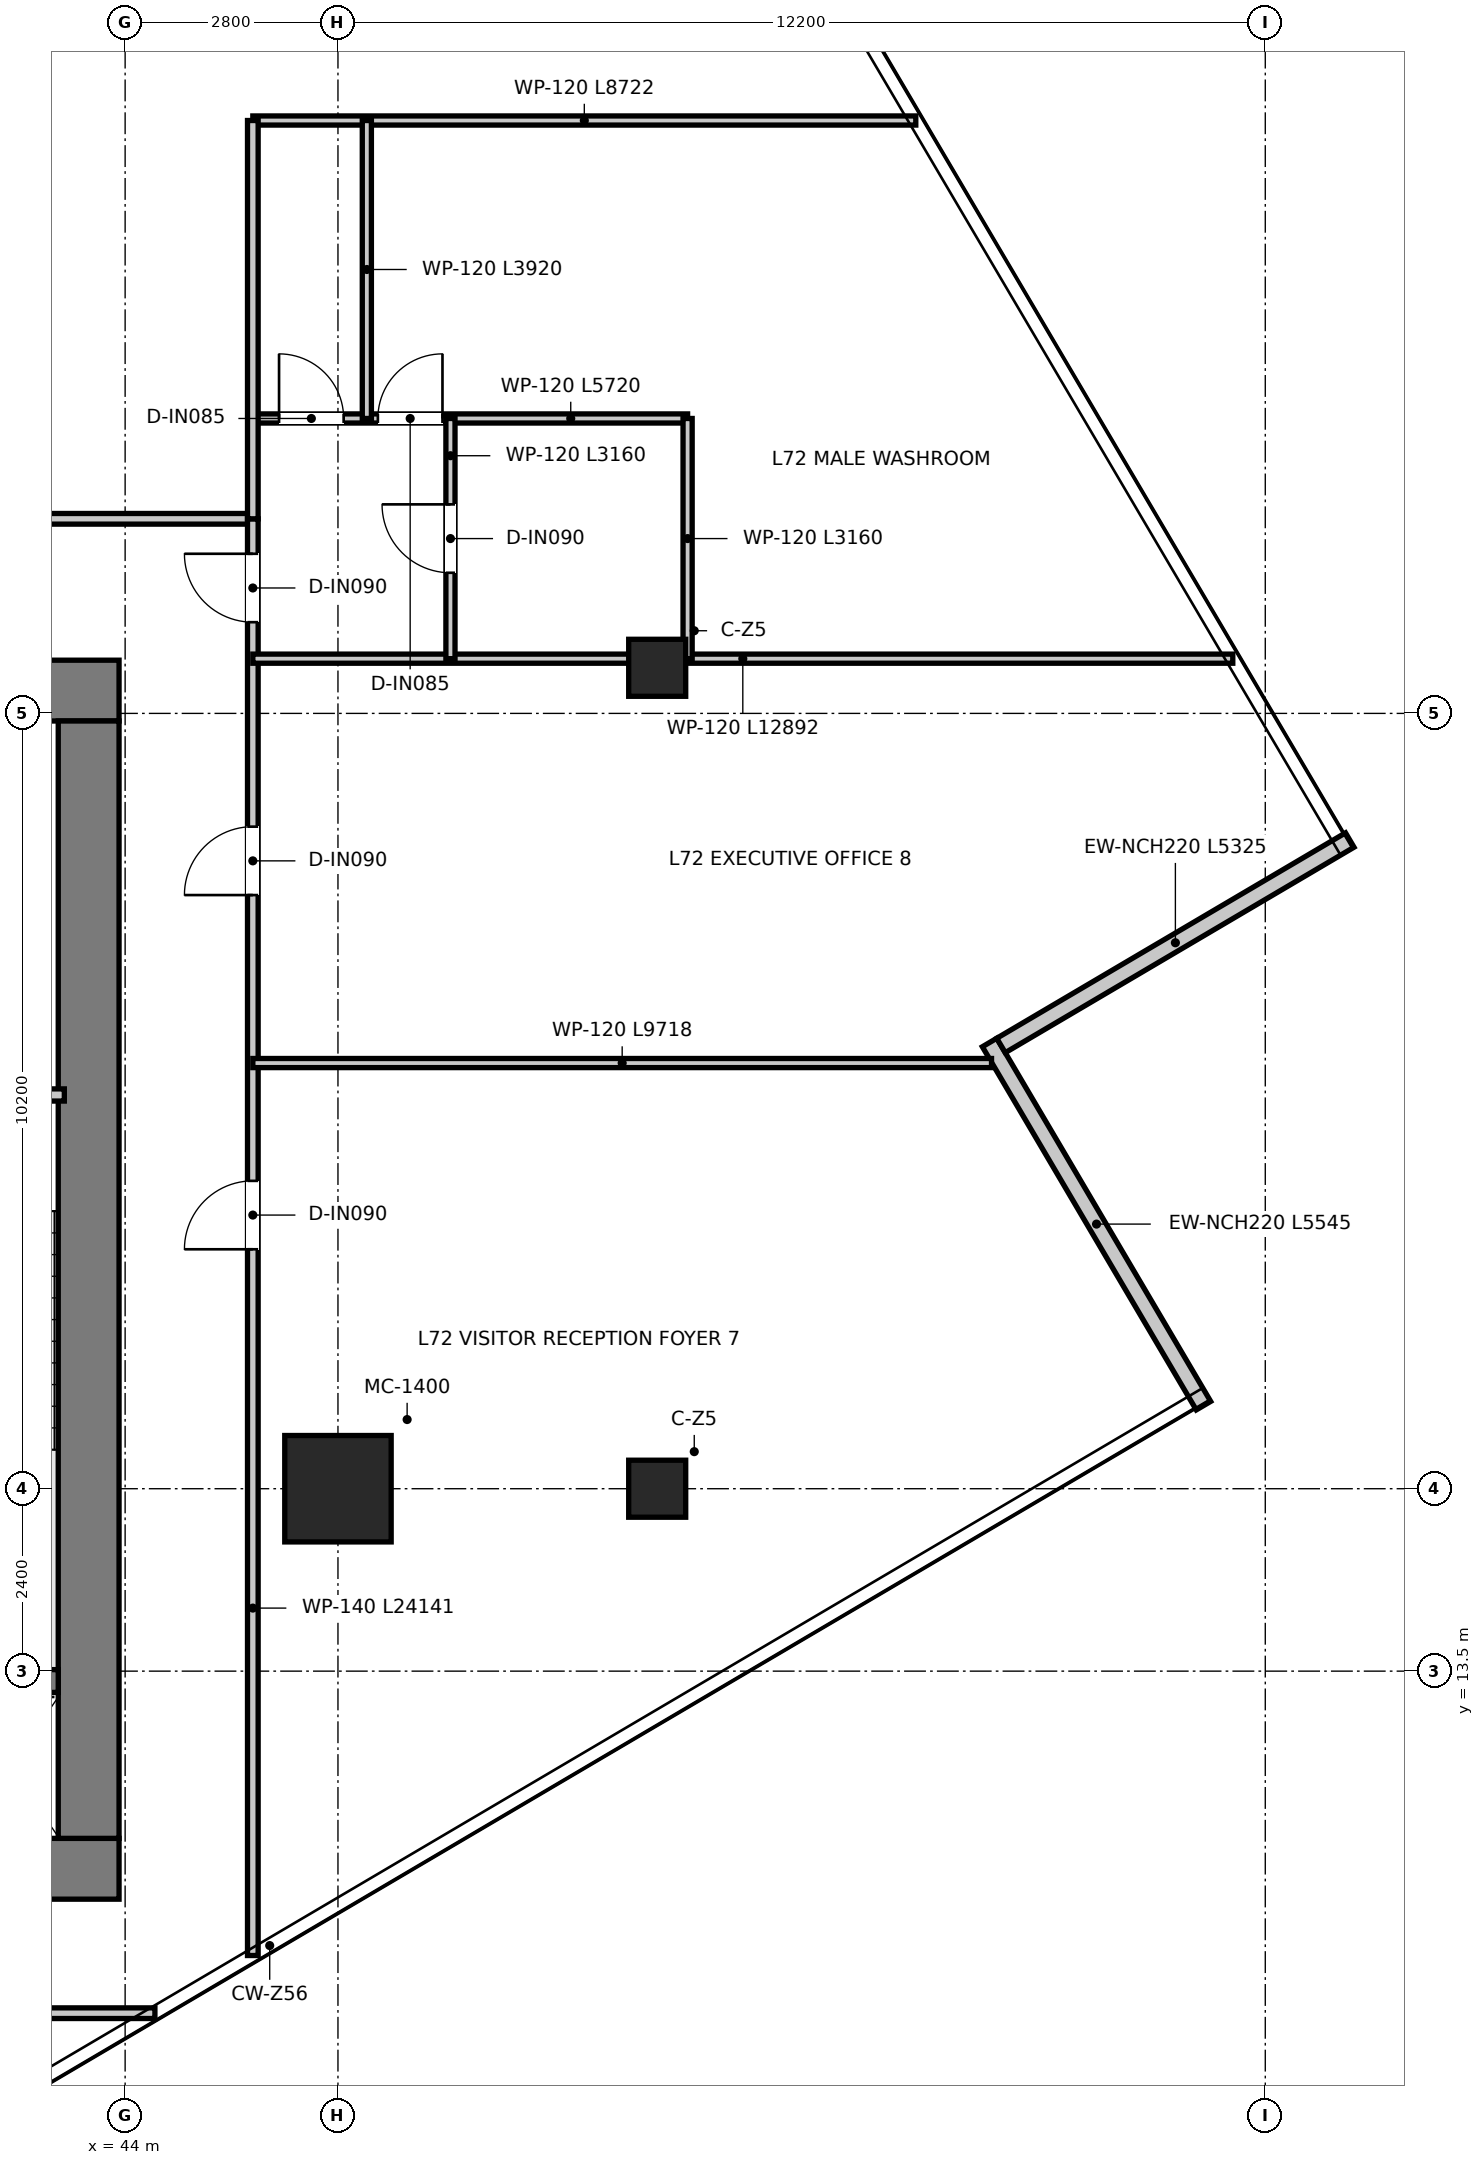
"""IFC4 building model, lengths in metres.
Left out: names, types, materials, properties, quantities, classifications, styles, units other than length and angle.
Written with IfcOpenShell. Run it as: python <this file> out.ifc"""

import sys

from ifc_helpers import new_model, si_unit, direction, frame, frame_2d, origin, origin_2d, place, context, subcontext, project, spatial, rectangle, extrude, source, transform, mapped, element, fill, save


model = new_model("IFC4")
c1 = context("Model", 3, precision=1e-05, world=origin(), true_north=direction((0.0, 1.0)))
c2 = subcontext(c1, "Body", "Model", "MODEL_VIEW")
j1 = project(units=[si_unit("LENGTHUNIT", "METRE"), si_unit("PLANEANGLEUNIT", "RADIAN")], contexts=[c1])
p1 = place(None, origin())
s1 = spatial("IfcSite", under=j1, at=p1, CompositionType="ELEMENT")
p2 = place(p1, origin())
s2 = spatial("IfcBuilding", under=s1, at=p2, CompositionType="ELEMENT")
p3 = place(p2, frame((0.0, 0.0, 295.05)))
s3 = spatial("IfcBuildingStorey", under=s2, at=p3, CompositionType="ELEMENT", Elevation=295.05)
p4 = place(p3, frame((28.08, 10.9, 0.0), z_axis=(0.0, 0.0, 1.0), x_axis=(1.0, 0.0, 0.0)))
e1 = element("IfcWall", 1, at=p4, inside=s3, PredefinedType="SHEAR", context=c2, shape_type="SweptSolid", body=[
    extrude(rectangle(XDim=15.84, YDim=0.8, at=frame_2d((7.92, 0.0))), origin(), (0.0, 0.0, 1.0), 3.95),
])
p5 = place(p3, frame((28.08, 26.4, 0.0), z_axis=(0.0, 0.0, 1.0), x_axis=(1.0, 0.0, 0.0)))
e2 = element("IfcWall", 2, at=p5, inside=s3, PredefinedType="SHEAR", context=c2, shape_type="SweptSolid", body=[
    extrude(rectangle(XDim=15.84, YDim=0.8, at=frame_2d((7.92, 0.0))), origin(), (0.0, 0.0, 1.0), 3.95),
])
p6 = place(p5, frame((7.22, 0.0, 0.0)))
e3 = element("IfcOpeningElement", 3, at=p6, cuts=e2, PredefinedType="OPENING", context=c2, shape_type="SweptSolid", body=[
    extrude(rectangle(XDim=1.4, YDim=2.2, at=frame_2d((0.7, 1.1))), frame((0.0, 0.41, 0.0), z_axis=(0.0, -1.0, 0.0), x_axis=(1.0, 0.0, 0.0)), (0.0, 0.0, 1.0), 0.82),
])
p7 = place(p5, frame((1.775, 0.0, 0.0)))
e4 = element("IfcOpeningElement", 4, at=p7, cuts=e2, PredefinedType="OPENING", context=c2, shape_type="SweptSolid", body=[
    extrude(rectangle(XDim=1.05, YDim=2.1, at=frame_2d((0.525, 1.05))), frame((0.0, 0.41, 0.0), z_axis=(0.0, -1.0, 0.0), x_axis=(1.0, 0.0, 0.0)), (0.0, 0.0, 1.0), 0.82),
])
p8 = place(p5, frame((13.015, 0.0, 0.0)))
e5 = element("IfcOpeningElement", 5, at=p8, cuts=e2, PredefinedType="OPENING", context=c2, shape_type="SweptSolid", body=[
    extrude(rectangle(XDim=1.05, YDim=2.1, at=frame_2d((0.525, 1.05))), frame((0.0, 0.41, 0.0), z_axis=(0.0, -1.0, 0.0), x_axis=(1.0, 0.0, 0.0)), (0.0, 0.0, 1.0), 0.82),
])
p9 = place(p3, frame((43.52, 11.3, 0.0), z_axis=(0.0, 0.0, 1.0), x_axis=(0.0, 1.0, 0.0)))
e6 = element("IfcWall", 6, at=p9, inside=s3, PredefinedType="SHEAR", context=c2, shape_type="SweptSolid", body=[
    extrude(rectangle(XDim=14.7, YDim=0.8, at=frame_2d((7.35, 0.0))), origin(), (0.0, 0.0, 1.0), 3.95),
])
p10 = place(p3, frame((40.02, 13.37, 0.0), z_axis=(0.0, 0.0, 1.0), x_axis=(1.0, 0.0, 0.0)))
e7 = element("IfcWall", 7, at=p10, inside=s3, PredefinedType="SHEAR", context=c2, shape_type="SweptSolid", body=[
    extrude(rectangle(XDim=3.1, YDim=0.3, at=frame_2d((1.55, 0.0))), origin(), (0.0, 0.0, 1.0), 3.95),
])
m1 = source(origin(), c2, "Body", "SweptSolid", [
    extrude(rectangle(XDim=1.4, YDim=1.4, at=origin_2d()), origin(), (0.0, 0.0, 1.0), 3.95),
])
p11 = place(p3, frame((46.8, 15.9, 0.0), z_axis=(0.0, 0.0, 1.0), x_axis=(1.0, 0.0, 0.0)))
e8 = element("IfcColumn", 8, at=p11, inside=s3, PredefinedType="USERDEFINED", context=c2, shape_type="MappedRepresentation", body=[
    mapped(m1, transform((0.0, 0.0, 0.0), x_axis=(1.0, 0.0, 0.0), y_axis=(0.0, 1.0, 0.0), z_axis=(0.0, 0.0, 1.0), scale=1.0)),
])
m2 = source(origin(), c2, "Body", "SweptSolid", [
    extrude(rectangle(XDim=0.75, YDim=0.75, at=origin_2d()), origin(), (0.0, 0.0, 1.0), 3.95),
])
for number, where, z_axis, x_axis in (
    (9, (51.0, 26.7, 0.0), (0.0, 0.0, 1.0), (1.0, 0.0, 0.0)),
    (10, (51.0, 15.9, 0.0), (0.0, 0.0, 1.0), (1.0, 0.0, 0.0)),
):
    element("IfcColumn", number, at=place(p3, frame(where, z_axis=z_axis, x_axis=x_axis)), inside=s3, PredefinedType="COLUMN", context=c2, shape_type="MappedRepresentation", body=[
        mapped(m2, transform((0.0, 0.0, 0.0), x_axis=(1.0, 0.0, 0.0), y_axis=(0.0, 1.0, 0.0), z_axis=(0.0, 0.0, 1.0), scale=1.0)),
    ])
p12 = place(p3, frame((58.187, 16.992, 0.0), z_axis=(0.0, 0.0, 1.0), x_axis=(-0.507551078836, 0.861621670092, 0.0)))
e11 = element("IfcWall", 11, at=p12, inside=s3, PredefinedType="ELEMENTEDWALL", context=c2, shape_type="SweptSolid", body=[
    extrude(rectangle(XDim=5.545, YDim=0.22, at=frame_2d((2.772, 0.0))), origin(), (0.0, 0.0, 1.0), 3.67),
])
p13 = place(p3, frame((55.523, 21.731, 0.0), z_axis=(0.0, 0.0, 1.0), x_axis=(0.861627616465, 0.507540984104, 0.0)))
e12 = element("IfcWall", 12, at=p13, inside=s3, PredefinedType="ELEMENTEDWALL", context=c2, shape_type="SweptSolid", body=[
    extrude(rectangle(XDim=5.325, YDim=0.22, at=frame_2d((2.663, 0.0))), origin(), (0.0, 0.0, 1.0), 3.67),
])
p14 = place(p3, frame((40.04, 21.08, 0.0), z_axis=(0.0, 0.0, 1.0), x_axis=(1.0, 0.0, 0.0)))
e13 = element("IfcWall", 13, at=p14, inside=s3, PredefinedType="PARTITIONING", context=c2, shape_type="SweptSolid", body=[
    extrude(rectangle(XDim=3.16, YDim=0.16, at=frame_2d((1.58, 0.0))), origin(), (0.0, 0.0, 1.0), 3.67),
])
p15 = place(p14, frame((1.055, 0.0, 0.0)))
e14 = element("IfcOpeningElement", 14, at=p15, cuts=e13, PredefinedType="OPENING", context=c2, shape_type="SweptSolid", body=[
    extrude(rectangle(XDim=1.05, YDim=2.1, at=frame_2d((0.525, 1.05))), frame((0.0, 0.09, 0.0), z_axis=(0.0, -1.0, 0.0), x_axis=(1.0, 0.0, 0.0)), (0.0, 0.0, 1.0), 0.18),
])
p16 = place(p3, frame((26.32, 28.66, 0.0), z_axis=(0.0, 0.0, 1.0), x_axis=(1.0, 0.0, 0.0)))
e15 = element("IfcWall", 15, at=p16, inside=s3, PredefinedType="PARTITIONING", context=c2, shape_type="SweptSolid", body=[
    extrude(rectangle(XDim=19.36, YDim=0.14, at=frame_2d((9.68, 0.0))), origin(), (0.0, 0.0, 1.0), 3.18),
])
p17 = place(p16, frame((4.265, 0.0, 0.0)))
e16 = element("IfcOpeningElement", 16, at=p17, cuts=e15, PredefinedType="OPENING", context=c2, shape_type="SweptSolid", body=[
    extrude(rectangle(XDim=0.95, YDim=2.1, at=frame_2d((0.475, 1.05))), frame((0.0, 0.08, 0.0), z_axis=(0.0, -1.0, 0.0), x_axis=(1.0, 0.0, 0.0)), (0.0, 0.0, 1.0), 0.16),
])
p18 = place(p16, frame((13.945, 0.0, 0.0)))
e17 = element("IfcOpeningElement", 17, at=p18, cuts=e15, PredefinedType="OPENING", context=c2, shape_type="SweptSolid", body=[
    extrude(rectangle(XDim=0.95, YDim=2.1, at=frame_2d((0.475, 1.05))), frame((0.0, 0.08, 0.0), z_axis=(0.0, -1.0, 0.0), x_axis=(1.0, 0.0, 0.0)), (0.0, 0.0, 1.0), 0.16),
])
p19 = place(p3, frame((45.68, 9.759, 0.0), z_axis=(0.0, 0.0, 1.0), x_axis=(0.0, 1.0, 0.0)))
e18 = element("IfcWall", 18, at=p19, inside=s3, PredefinedType="PARTITIONING", context=c2, shape_type="SweptSolid", body=[
    extrude(rectangle(XDim=18.901, YDim=0.14, at=frame_2d((9.451, 0.0))), origin(), (0.0, 0.0, 1.0), 3.13),
])
p20 = place(p19, frame((17.541, 0.0, 0.0)))
e19 = element("IfcOpeningElement", 19, at=p20, cuts=e18, PredefinedType="OPENING", context=c2, shape_type="SweptSolid", body=[
    extrude(rectangle(XDim=0.9, YDim=2.1, at=frame_2d((0.45, 1.05))), frame((0.0, 0.08, 0.0), z_axis=(0.0, -1.0, 0.0), x_axis=(1.0, 0.0, 0.0)), (0.0, 0.0, 1.0), 0.16),
])
p21 = place(p19, frame((9.291, 0.0, 0.0)))
e20 = element("IfcOpeningElement", 20, at=p21, cuts=e18, PredefinedType="OPENING", context=c2, shape_type="SweptSolid", body=[
    extrude(rectangle(XDim=0.9, YDim=2.1, at=frame_2d((0.45, 1.05))), frame((0.0, 0.08, 0.0), z_axis=(0.0, -1.0, 0.0), x_axis=(1.0, 0.0, 0.0)), (0.0, 0.0, 1.0), 0.16),
])
p22 = place(p19, frame((13.951, 0.0, 0.0)))
e21 = element("IfcOpeningElement", 21, at=p22, cuts=e18, PredefinedType="OPENING", context=c2, shape_type="SweptSolid", body=[
    extrude(rectangle(XDim=0.9, YDim=2.1, at=frame_2d((0.45, 1.05))), frame((0.0, 0.08, 0.0), z_axis=(0.0, -1.0, 0.0), x_axis=(1.0, 0.0, 0.0)), (0.0, 0.0, 1.0), 0.16),
])
p23 = place(p3, frame((23.783, 9.0, 0.0), z_axis=(0.0, 0.0, 1.0), x_axis=(1.0, 0.0, 0.0)))
e22 = element("IfcWall", 22, at=p23, inside=s3, PredefinedType="PARTITIONING", context=c2, shape_type="SweptSolid", body=[
    extrude(rectangle(XDim=20.609, YDim=0.14, at=frame_2d((10.304, 0.0))), origin(), (0.0, 0.0, 1.0), 3.67),
])
p24 = place(p23, frame((11.767, 0.0, 0.0)))
e23 = element("IfcOpeningElement", 23, at=p24, cuts=e22, PredefinedType="OPENING", context=c2, shape_type="SweptSolid", body=[
    extrude(rectangle(XDim=0.9, YDim=2.1, at=frame_2d((0.45, 1.05))), frame((0.0, 0.08, 0.0), z_axis=(0.0, -1.0, 0.0), x_axis=(1.0, 0.0, 0.0)), (0.0, 0.0, 1.0), 0.16),
])
p25 = place(p3, frame((45.68, 26.82, 0.0), z_axis=(0.0, 0.0, 1.0), x_axis=(1.0, 0.0, 0.0)))
e24 = element("IfcWall", 24, at=p25, inside=s3, PredefinedType="PARTITIONING", context=c2, shape_type="SweptSolid", body=[
    extrude(rectangle(XDim=12.893, YDim=0.12, at=frame_2d((6.446, 0.0))), origin(), (0.0, 0.0, 1.0), 3.13),
])
p26 = place(p3, frame((45.68, 33.9, 0.0), z_axis=(0.0, 0.0, 1.0), x_axis=(1.0, 0.0, 0.0)))
e25 = element("IfcWall", 25, at=p26, inside=s3, PredefinedType="PARTITIONING", context=c2, shape_type="SweptSolid", body=[
    extrude(rectangle(XDim=8.722, YDim=0.12, at=frame_2d((4.361, 0.0))), origin(), (0.0, 0.0, 1.0), 3.13),
])
p27 = place(p3, frame((45.68, 29.98, 0.0), z_axis=(0.0, 0.0, 1.0), x_axis=(1.0, 0.0, 0.0)))
e26 = element("IfcWall", 26, at=p27, inside=s3, PredefinedType="PARTITIONING", context=c2, shape_type="SweptSolid", body=[
    extrude(rectangle(XDim=5.72, YDim=0.12, at=frame_2d((2.86, 0.0))), origin(), (0.0, 0.0, 1.0), 3.13),
])
p28 = place(p27, frame((1.645, 0.0, 0.0)))
e27 = element("IfcOpeningElement", 27, at=p28, cuts=e26, PredefinedType="OPENING", context=c2, shape_type="SweptSolid", body=[
    extrude(rectangle(XDim=0.85, YDim=2.1, at=frame_2d((0.425, 1.05))), frame((0.0, 0.07, 0.0), z_axis=(0.0, -1.0, 0.0), x_axis=(1.0, 0.0, 0.0)), (0.0, 0.0, 1.0), 0.14),
])
p29 = place(p27, frame((0.345, 0.0, 0.0)))
e28 = element("IfcOpeningElement", 28, at=p29, cuts=e26, PredefinedType="OPENING", context=c2, shape_type="SweptSolid", body=[
    extrude(rectangle(XDim=0.85, YDim=2.1, at=frame_2d((0.425, 1.05))), frame((0.0, 0.07, 0.0), z_axis=(0.0, -1.0, 0.0), x_axis=(1.0, 0.0, 0.0)), (0.0, 0.0, 1.0), 0.14),
])
p30 = place(p3, frame((51.4, 26.82, 0.0), z_axis=(0.0, 0.0, 1.0), x_axis=(0.0, 1.0, 0.0)))
e29 = element("IfcWall", 29, at=p30, inside=s3, PredefinedType="PARTITIONING", context=c2, shape_type="SweptSolid", body=[
    extrude(rectangle(XDim=3.16, YDim=0.12, at=frame_2d((1.58, 0.0))), origin(), (0.0, 0.0, 1.0), 3.67),
])
p31 = place(p3, frame((48.28, 26.82, 0.0), z_axis=(0.0, 0.0, 1.0), x_axis=(0.0, 1.0, 0.0)))
e30 = element("IfcWall", 30, at=p31, inside=s3, PredefinedType="PARTITIONING", context=c2, shape_type="SweptSolid", body=[
    extrude(rectangle(XDim=3.16, YDim=0.12, at=frame_2d((1.58, 0.0))), origin(), (0.0, 0.0, 1.0), 3.18),
])
p32 = place(p31, frame((1.13, 0.0, 0.0)))
e31 = element("IfcOpeningElement", 31, at=p32, cuts=e30, PredefinedType="OPENING", context=c2, shape_type="SweptSolid", body=[
    extrude(rectangle(XDim=0.9, YDim=2.1, at=frame_2d((0.45, 1.05))), frame((0.0, 0.07, 0.0), z_axis=(0.0, -1.0, 0.0), x_axis=(1.0, 0.0, 0.0)), (0.0, 0.0, 1.0), 0.14),
])
p33 = place(p3, frame((47.18, 29.98, 0.0), z_axis=(0.0, 0.0, 1.0), x_axis=(0.0, 1.0, 0.0)))
e32 = element("IfcWall", 32, at=p33, inside=s3, PredefinedType="PARTITIONING", context=c2, shape_type="SweptSolid", body=[
    extrude(rectangle(XDim=3.92, YDim=0.12, at=frame_2d((1.96, 0.0))), origin(), (0.0, 0.0, 1.0), 3.31),
])
p34 = place(p3, frame((45.68, 28.66, 0.0), z_axis=(0.0, 0.0, 1.0), x_axis=(0.0, 1.0, 0.0)))
e33 = element("IfcWall", 33, at=p34, inside=s3, PredefinedType="PARTITIONING", context=c2, shape_type="SweptSolid", body=[
    extrude(rectangle(XDim=5.24, YDim=0.14, at=frame_2d((2.62, 0.0))), origin(), (0.0, 0.0, 1.0), 3.43),
])
p35 = place(p3, frame((45.68, 21.5, 0.0), z_axis=(0.0, 0.0, 1.0), x_axis=(1.0, 0.0, 0.0)))
e34 = element("IfcWall", 34, at=p35, inside=s3, PredefinedType="PARTITIONING", context=c2, shape_type="SweptSolid", body=[
    extrude(rectangle(XDim=9.719, YDim=0.12, at=frame_2d((4.859, 0.0))), origin(), (0.0, 0.0, 1.0), 3.13),
])
p36 = place(p20, origin())
e35 = element("IfcDoor", 35, at=p36, inside=s3, OperationType="SINGLE_SWING_RIGHT", PredefinedType="DOOR", context=c2, shape_type="SweptSolid", body=[
    extrude(rectangle(XDim=0.9, YDim=2.1, at=frame_2d((0.45, 1.05))), frame((0.0, 0.025, 0.0), z_axis=(0.0, -1.0, 0.0), x_axis=(1.0, 0.0, 0.0)), (0.0, 0.0, 1.0), 0.05),
])
fill(e19, e35)
p37 = place(p28, origin())
e36 = element("IfcDoor", 36, at=p37, inside=s3, OperationType="SINGLE_SWING_RIGHT", PredefinedType="DOOR", context=c2, shape_type="SweptSolid", body=[
    extrude(rectangle(XDim=0.85, YDim=2.1, at=frame_2d((0.425, 1.05))), frame((0.0, 0.025, 0.0), z_axis=(0.0, -1.0, 0.0), x_axis=(1.0, 0.0, 0.0)), (0.0, 0.0, 1.0), 0.05),
])
fill(e27, e36)
p38 = place(p29, origin())
e37 = element("IfcDoor", 37, at=p38, inside=s3, OperationType="SINGLE_SWING_LEFT", PredefinedType="DOOR", context=c2, shape_type="SweptSolid", body=[
    extrude(rectangle(XDim=0.85, YDim=2.1, at=frame_2d((0.425, 1.05))), frame((0.0, 0.025, 0.0), z_axis=(0.0, -1.0, 0.0), x_axis=(1.0, 0.0, 0.0)), (0.0, 0.0, 1.0), 0.05),
])
fill(e28, e37)
p39 = place(p32, origin())
e38 = element("IfcDoor", 38, at=p39, inside=s3, OperationType="SINGLE_SWING_RIGHT", PredefinedType="DOOR", context=c2, shape_type="SweptSolid", body=[
    extrude(rectangle(XDim=0.9, YDim=2.1, at=frame_2d((0.45, 1.05))), frame((0.0, 0.025, 0.0), z_axis=(0.0, -1.0, 0.0), x_axis=(1.0, 0.0, 0.0)), (0.0, 0.0, 1.0), 0.05),
])
fill(e31, e38)
p40 = place(p21, origin())
e39 = element("IfcDoor", 39, at=p40, inside=s3, OperationType="SINGLE_SWING_LEFT", PredefinedType="DOOR", context=c2, shape_type="SweptSolid", body=[
    extrude(rectangle(XDim=0.9, YDim=2.1, at=frame_2d((0.45, 1.05))), frame((0.0, 0.025, 0.0), z_axis=(0.0, -1.0, 0.0), x_axis=(1.0, 0.0, 0.0)), (0.0, 0.0, 1.0), 0.05),
])
fill(e20, e39)
p41 = place(p22, origin())
e40 = element("IfcDoor", 40, at=p41, inside=s3, OperationType="SINGLE_SWING_LEFT", PredefinedType="DOOR", context=c2, shape_type="SweptSolid", body=[
    extrude(rectangle(XDim=0.9, YDim=2.1, at=frame_2d((0.45, 1.05))), frame((0.0, 0.025, 0.0), z_axis=(0.0, -1.0, 0.0), x_axis=(1.0, 0.0, 0.0)), (0.0, 0.0, 1.0), 0.05),
])
fill(e21, e40)
save(model, sys.argv[1])
